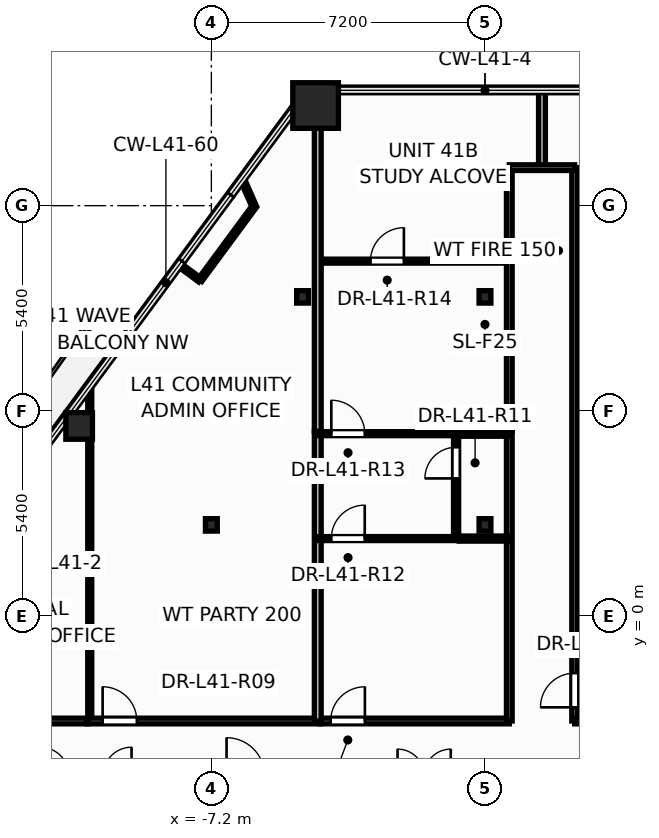
"""IFC4 building model, lengths in metres.
Left out: names, types, materials, properties, quantities, classifications, styles, units other than length and angle.
Written with IfcOpenShell. Run it as: python <this file> out.ifc"""

import sys

from ifc_helpers import new_model, si_unit, direction, frame, frame_2d, origin, origin_2d, place, context, subcontext, project, spatial, rectangle, hollow_rectangle, hollow_circle, i_section, extrude, element, fill, save


model = new_model("IFC4")
c1 = context("Model", 3, precision=1e-05, world=origin(), true_north=direction((0.0, 1.0)))
c2 = subcontext(c1, "Body", "Model", "MODEL_VIEW")
j1 = project(units=[si_unit("LENGTHUNIT", "METRE"), si_unit("PLANEANGLEUNIT", "RADIAN")], contexts=[c1])
p1 = place(None, origin())
s1 = spatial("IfcSite", under=j1, at=p1, CompositionType="ELEMENT")
p2 = place(p1, origin())
s2 = spatial("IfcBuilding", under=s1, at=p2, CompositionType="ELEMENT")
p3 = place(p2, frame((0.0, 0.0, 158.1)))
s3 = spatial("IfcBuildingStorey", under=s2, at=p3, CompositionType="ELEMENT", Elevation=158.1)
p4 = place(p3, frame((-4.457, 13.435, 0.0), z_axis=(0.0, 0.0, 1.0), x_axis=(1.0, 0.0, 0.0)))
e1 = element("IfcColumn", 1, at=p4, inside=s3, PredefinedType="COLUMN", context=c2, shape_type="SweptSolid", body=[
    extrude(hollow_rectangle(XDim=1.2, YDim=1.2, WallThickness=0.055, at=origin_2d()), origin(), (0.0, 0.0, 1.0), 3.6),
])
p5 = place(p3, frame((-10.679, 5.003, 0.0), z_axis=(0.0, 0.0, 1.0), x_axis=(1.0, 0.0, 0.0)))
e2 = element("IfcColumn", 2, at=p5, inside=s3, PredefinedType="COLUMN", context=c2, shape_type="SweptSolid", body=[
    extrude(hollow_circle(Radius=0.35, WallThickness=0.03, at=origin_2d()), origin(), (0.0, 0.0, 1.0), 3.6),
])
for number, where, z_axis, x_axis in (
    (3, (-7.2, 2.4, 0.0), (0.0, 0.0, 1.0), (1.0, 0.0, 0.0)),
    (4, (0.0, 2.4, 0.0), (0.0, 0.0, 1.0), (1.0, 0.0, 0.0)),
    (5, (-4.8, 8.4, 0.0), (0.0, 0.0, 1.0), (1.0, 0.0, 0.0)),
    (6, (0.0, 8.4, 0.0), (0.0, 0.0, 1.0), (1.0, 0.0, 0.0)),
):
    element("IfcColumn", number, at=place(p3, frame(where, z_axis=z_axis, x_axis=x_axis)), inside=s3, PredefinedType="COLUMN", context=c2, shape_type="SweptSolid", body=[
        extrude(i_section(OverallWidth=0.311, OverallDepth=0.327, WebThickness=0.016, FlangeThickness=0.025, at=origin_2d()), origin(), (0.0, 0.0, 1.0), 3.6),
    ])
p6 = place(p3, frame((2.36, -2.76, 0.0), z_axis=(0.0, 0.0, 1.0), x_axis=(0.0, 1.0, 0.0)))
e7 = element("IfcWall", 7, at=p6, inside=s3, PredefinedType="PARTITIONING", context=c2, shape_type="SweptSolid", body=[
    extrude(rectangle(XDim=14.56, YDim=0.15, at=frame_2d((7.28, 0.0))), origin(), (0.0, 0.0, 1.0), 2.325),
])
p7 = place(p6, frame((0.36, 0.0, 0.0)))
e8 = element("IfcOpeningElement", 8, at=p7, cuts=e7, PredefinedType="OPENING", context=c2, shape_type="SweptSolid", body=[
    extrude(rectangle(XDim=0.906, YDim=2.104, at=frame_2d((0.45, 1.052))), frame((0.0, 0.085, 0.0), z_axis=(0.0, -1.0, 0.0), x_axis=(1.0, 0.0, 0.0)), (0.0, 0.0, 1.0), 0.17),
])
p8 = place(p3, frame((-10.4, -2.76, 0.0), z_axis=(0.0, 0.0, 1.0), x_axis=(0.0, 1.0, 0.0)))
e9 = element("IfcWall", 9, at=p8, inside=s3, PredefinedType="PARTITIONING", context=c2, shape_type="SweptSolid", body=[
    extrude(rectangle(XDim=8.815, YDim=0.105, at=frame_2d((4.408, 0.0))), origin(), (0.0, 0.0, 1.0), 2.617),
])
p9 = place(p3, frame((-10.46, -2.76, 0.0), z_axis=(0.0, 0.0, 1.0), x_axis=(1.0, 0.0, 0.0)))
e10 = element("IfcWall", 10, at=p9, inside=s3, PredefinedType="PARTITIONING", context=c2, shape_type="SweptSolid", body=[
    extrude(rectangle(XDim=6.12, YDim=0.15, at=frame_2d((3.06, 0.0))), origin(), (0.0, 0.0, 1.0), 2.325),
])
p10 = place(p9, frame((0.399, 0.0, 0.0)))
e11 = element("IfcOpeningElement", 11, at=p10, cuts=e10, PredefinedType="OPENING", context=c2, shape_type="SweptSolid", body=[
    extrude(rectangle(XDim=0.906, YDim=2.104, at=frame_2d((0.45, 1.052))), frame((0.0, 0.085, 0.0), z_axis=(0.0, -1.0, 0.0), x_axis=(1.0, 0.0, 0.0)), (0.0, 0.0, 1.0), 0.17),
])
p11 = place(p3, frame((2.36, -2.76, 0.0), z_axis=(0.0, 0.0, 1.0), x_axis=(1.0, 0.0, 0.0)))
e12 = element("IfcWall", 12, at=p11, inside=s3, PredefinedType="PARTITIONING", context=c2, shape_type="SweptSolid", body=[
    extrude(rectangle(XDim=5.5, YDim=0.15, at=frame_2d((2.75, 0.0))), origin(), (0.0, 0.0, 1.0), 2.325),
])
p12 = place(p3, frame((-4.338, -2.76, 0.0), z_axis=(0.0, 0.0, 1.0), x_axis=(1.0, 0.0, 0.0)))
e13 = element("IfcWall", 13, at=p12, inside=s3, PredefinedType="PARTITIONING", context=c2, shape_type="SweptSolid", body=[
    extrude(rectangle(XDim=4.978, YDim=0.15, at=frame_2d((2.489, 0.0))), origin(), (0.0, 0.0, 1.0), 2.325),
])
p13 = place(p12, frame((0.278, 0.0, 0.0)))
e14 = element("IfcOpeningElement", 14, at=p13, cuts=e13, PredefinedType="OPENING", context=c2, shape_type="SweptSolid", body=[
    extrude(rectangle(XDim=0.906, YDim=2.104, at=frame_2d((0.45, 1.052))), frame((0.0, 0.085, 0.0), z_axis=(0.0, -1.0, 0.0), x_axis=(1.0, 0.0, 0.0)), (0.0, 0.0, 1.0), 0.17),
])
p14 = place(p3, frame((-4.4, 9.34, 0.0), z_axis=(0.0, 0.0, 1.0), x_axis=(1.0, 0.0, 0.0)))
e15 = element("IfcWall", 15, at=p14, inside=s3, PredefinedType="PARTITIONING", context=c2, shape_type="SweptSolid", body=[
    extrude(rectangle(XDim=5.04, YDim=0.105, at=frame_2d((2.52, 0.0))), origin(), (0.0, 0.0, 1.0), 3.35),
])
p15 = place(p14, frame((1.387, 0.0, 0.0)))
e16 = element("IfcOpeningElement", 16, at=p15, cuts=e15, PredefinedType="OPENING", context=c2, shape_type="SweptSolid", body=[
    extrude(rectangle(XDim=0.886, YDim=2.104, at=frame_2d((0.44, 1.052))), frame((0.0, 0.062, 0.0), z_axis=(0.0, -1.0, 0.0), x_axis=(1.0, 0.0, 0.0)), (0.0, 0.0, 1.0), 0.125),
])
p16 = place(p3, frame((0.64, -2.76, 0.0), z_axis=(0.0, 0.0, 1.0), x_axis=(0.0, 1.0, 0.0)))
e17 = element("IfcWall", 17, at=p16, inside=s3, PredefinedType="PARTITIONING", context=c2, shape_type="SweptSolid", body=[
    extrude(rectangle(XDim=7.62, YDim=0.15, at=frame_2d((3.81, 0.0))), origin(), (0.0, 0.0, 1.0), 2.325),
])
p17 = place(p3, frame((-4.4, -2.76, 0.0), z_axis=(0.0, 0.0, 1.0), x_axis=(0.0, 1.0, 0.0)))
e18 = element("IfcWall", 18, at=p17, inside=s3, PredefinedType="PARTITIONING", context=c2, shape_type="SweptSolid", body=[
    extrude(rectangle(XDim=7.62, YDim=0.18, at=frame_2d((3.81, 0.0))), origin(), (0.0, 0.0, 1.0), 2.325),
])
p18 = place(p3, frame((0.64, 4.862, 0.0), z_axis=(0.0, 0.0, 1.0), x_axis=(0.0, 1.0, 0.0)))
e19 = element("IfcWall", 19, at=p18, inside=s3, PredefinedType="PARTITIONING", context=c2, shape_type="SweptSolid", body=[
    extrude(rectangle(XDim=6.938, YDim=0.15, at=frame_2d((3.469, 0.0))), origin(), (0.0, 0.0, 1.0), 2.617),
])
p19 = place(p3, frame((-4.4, 4.862, 0.0), z_axis=(0.0, 0.0, 1.0), x_axis=(0.0, 1.0, 0.0)))
e20 = element("IfcWall", 20, at=p19, inside=s3, PredefinedType="PARTITIONING", context=c2, shape_type="SweptSolid", body=[
    extrude(rectangle(XDim=8.973, YDim=0.18, at=frame_2d((4.486, 0.0))), origin(), (0.0, 0.0, 1.0), 2.617),
])
p20 = place(p3, frame((-14.64, -2.76, 0.0), z_axis=(0.0, 0.0, 1.0), x_axis=(1.0, 0.0, 0.0)))
e21 = element("IfcWall", 21, at=p20, inside=s3, PredefinedType="PARTITIONING", context=c2, shape_type="SweptSolid", body=[
    extrude(rectangle(XDim=4.178, YDim=0.15, at=frame_2d((2.089, 0.0))), origin(), (0.0, 0.0, 1.0), 3.35),
])
p21 = place(p20, frame((0.357, 0.0, 0.0)))
e22 = element("IfcOpeningElement", 22, at=p21, cuts=e21, PredefinedType="OPENING", context=c2, shape_type="SweptSolid", body=[
    extrude(rectangle(XDim=0.906, YDim=2.104, at=frame_2d((0.45, 1.052))), frame((0.0, 0.085, 0.0), z_axis=(0.0, -1.0, 0.0), x_axis=(1.0, 0.0, 0.0)), (0.0, 0.0, 1.0), 0.17),
])
p22 = place(p3, frame((-4.4, 2.04, 0.0), z_axis=(0.0, 0.0, 1.0), x_axis=(1.0, 0.0, 0.0)))
e23 = element("IfcWall", 23, at=p22, inside=s3, PredefinedType="PARTITIONING", context=c2, shape_type="SweptSolid", body=[
    extrude(rectangle(XDim=3.72, YDim=0.105, at=frame_2d((1.86, 0.0))), origin(), (0.0, 0.0, 1.0), 2.918),
])
p23 = place(p22, frame((0.356, 0.0, 0.0)))
e24 = element("IfcOpeningElement", 24, at=p23, cuts=e23, PredefinedType="OPENING", context=c2, shape_type="SweptSolid", body=[
    extrude(rectangle(XDim=0.886, YDim=2.104, at=frame_2d((0.44, 1.052))), frame((0.0, 0.062, 0.0), z_axis=(0.0, -1.0, 0.0), x_axis=(1.0, 0.0, 0.0)), (0.0, 0.0, 1.0), 0.125),
])
p24 = place(p3, frame((-4.4, 4.8, 0.0), z_axis=(0.0, 0.0, 1.0), x_axis=(1.0, 0.0, 0.0)))
e25 = element("IfcWall", 25, at=p24, inside=s3, PredefinedType="PARTITIONING", context=c2, shape_type="SweptSolid", body=[
    extrude(rectangle(XDim=3.64, YDim=0.105, at=frame_2d((1.82, 0.0))), origin(), (0.0, 0.0, 1.0), 2.918),
])
p25 = place(p24, frame((0.356, 0.0, 0.0)))
e26 = element("IfcOpeningElement", 26, at=p25, cuts=e25, PredefinedType="OPENING", context=c2, shape_type="SweptSolid", body=[
    extrude(rectangle(XDim=0.886, YDim=2.104, at=frame_2d((0.44, 1.052))), frame((0.0, 0.062, 0.0), z_axis=(0.0, -1.0, 0.0), x_axis=(1.0, 0.0, 0.0)), (0.0, 0.0, 1.0), 0.125),
])
p26 = place(p3, frame((-0.76, 2.04, 0.0), z_axis=(0.0, 0.0, 1.0), x_axis=(0.0, 1.0, 0.0)))
e27 = element("IfcWall", 27, at=p26, inside=s3, PredefinedType="PARTITIONING", context=c2, shape_type="SweptSolid", body=[
    extrude(rectangle(XDim=2.76, YDim=0.135, at=frame_2d((1.38, 0.0))), origin(), (0.0, 0.0, 1.0), 2.325),
])
p27 = place(p26, frame((1.583, 0.0, 0.0)))
e28 = element("IfcOpeningElement", 28, at=p27, cuts=e27, PredefinedType="OPENING", context=c2, shape_type="SweptSolid", body=[
    extrude(rectangle(XDim=0.826, YDim=2.104, at=frame_2d((0.41, 1.052))), frame((0.0, 0.078, 0.0), z_axis=(0.0, -1.0, 0.0), x_axis=(1.0, 0.0, 0.0)), (0.0, 0.0, 1.0), 0.155),
])
p28 = place(p3, frame((-6.071, 10.776, 0.0), z_axis=(0.0, 0.0, 1.0), x_axis=(-0.593742732842, -0.804654936726, 0.0)))
e29 = element("IfcWall", 29, at=p28, inside=s3, PredefinedType="PARTITIONING", context=c2, shape_type="SweptSolid", body=[
    extrude(rectangle(XDim=2.404, YDim=0.12, at=frame_2d((1.202, 0.0))), origin(), (0.0, 0.0, 1.0), 3.35),
])
p29 = place(p3, frame((1.5, 11.8, 0.0), z_axis=(0.0, 0.0, 1.0), x_axis=(0.0, 1.0, 0.0)))
e30 = element("IfcWall", 30, at=p29, inside=s3, PredefinedType="PARTITIONING", context=c2, shape_type="SweptSolid", body=[
    extrude(rectangle(XDim=2.035, YDim=0.18, at=frame_2d((1.017, 0.0))), origin(), (0.0, 0.0, 1.0), 2.792),
])
p30 = place(p3, frame((-0.678, 2.04, 0.0), z_axis=(0.0, 0.0, 1.0), x_axis=(1.0, 0.0, 0.0)))
e31 = element("IfcWall", 31, at=p30, inside=s3, PredefinedType="PARTITIONING", context=c2, shape_type="SweptSolid", body=[
    extrude(rectangle(XDim=1.318, YDim=0.135, at=frame_2d((0.659, 0.0))), origin(), (0.0, 0.0, 1.0), 2.325),
])
p31 = place(p3, frame((-0.76, 4.8, 0.0), z_axis=(0.0, 0.0, 1.0), x_axis=(1.0, 0.0, 0.0)))
e32 = element("IfcWall", 32, at=p31, inside=s3, PredefinedType="PARTITIONING", context=c2, shape_type="SweptSolid", body=[
    extrude(rectangle(XDim=1.4, YDim=0.135, at=frame_2d((0.7, 0.0))), origin(), (0.0, 0.0, 1.0), 2.325),
])
p32 = place(p3, frame((0.64, 11.8, 0.0), z_axis=(0.0, 0.0, 1.0), x_axis=(1.0, 0.0, 0.0)))
e33 = element("IfcWall", 33, at=p32, inside=s3, PredefinedType="PARTITIONING", context=c2, shape_type="SweptSolid", body=[
    extrude(rectangle(XDim=1.72, YDim=0.15, at=frame_2d((0.86, 0.0))), origin(), (0.0, 0.0, 1.0), 3.35),
])
p33 = place(p3, frame((-6.383, 11.481, 0.0), z_axis=(0.0, 0.0, 1.0), x_axis=(0.404053030965, -0.91473556188, 0.0)))
e34 = element("IfcWall", 34, at=p33, inside=s3, PredefinedType="PARTITIONING", context=c2, shape_type="SweptSolid", body=[
    extrude(rectangle(XDim=0.771, YDim=0.12, at=frame_2d((0.386, 0.0))), origin(), (0.0, 0.0, 1.0), 2.792),
])
p34 = place(p3, frame((-7.499, 8.841, 0.0), z_axis=(0.0, 0.0, 1.0), x_axis=(-0.804652806385, 0.593745619922, 0.0)))
e35 = element("IfcWall", 35, at=p34, inside=s3, PredefinedType="PARTITIONING", context=c2, shape_type="SweptSolid", body=[
    extrude(rectangle(XDim=0.67, YDim=0.12, at=frame_2d((0.335, 0.0))), origin(), (0.0, 0.0, 1.0), 2.792),
])
p35 = place(p10, origin())
e36 = element("IfcDoor", 36, at=p35, inside=s3, OperationType="SINGLE_SWING_LEFT", PredefinedType="DOOR", context=c2, shape_type="SweptSolid", body=[
    extrude(rectangle(XDim=0.9, YDim=2.1, at=frame_2d((0.45, 1.05))), frame((0.0, 0.025, 0.0), z_axis=(0.0, -1.0, 0.0), x_axis=(1.0, 0.0, 0.0)), (0.0, 0.0, 1.0), 0.05),
])
fill(e11, e36)
p36 = place(p13, origin())
e37 = element("IfcDoor", 37, at=p36, inside=s3, OperationType="SINGLE_SWING_RIGHT", PredefinedType="DOOR", context=c2, shape_type="SweptSolid", body=[
    extrude(rectangle(XDim=0.9, YDim=2.1, at=frame_2d((0.45, 1.05))), frame((0.0, 0.025, 0.0), z_axis=(0.0, -1.0, 0.0), x_axis=(1.0, 0.0, 0.0)), (0.0, 0.0, 1.0), 0.05),
])
fill(e14, e37)
p37 = place(p27, origin())
e38 = element("IfcDoor", 38, at=p37, inside=s3, OperationType="SINGLE_SWING_LEFT", PredefinedType="DOOR", context=c2, shape_type="SweptSolid", body=[
    extrude(rectangle(XDim=0.82, YDim=2.1, at=frame_2d((0.41, 1.05))), frame((0.0, 0.025, 0.0), z_axis=(0.0, -1.0, 0.0), x_axis=(1.0, 0.0, 0.0)), (0.0, 0.0, 1.0), 0.05),
])
fill(e28, e38)
p38 = place(p23, origin())
e39 = element("IfcDoor", 39, at=p38, inside=s3, OperationType="SINGLE_SWING_RIGHT", PredefinedType="DOOR", context=c2, shape_type="SweptSolid", body=[
    extrude(rectangle(XDim=0.88, YDim=2.1, at=frame_2d((0.44, 1.05))), frame((0.0, 0.025, 0.0), z_axis=(0.0, -1.0, 0.0), x_axis=(1.0, 0.0, 0.0)), (0.0, 0.0, 1.0), 0.05),
])
fill(e24, e39)
p39 = place(p25, origin())
e40 = element("IfcDoor", 40, at=p39, inside=s3, OperationType="SINGLE_SWING_LEFT", PredefinedType="DOOR", context=c2, shape_type="SweptSolid", body=[
    extrude(rectangle(XDim=0.88, YDim=2.1, at=frame_2d((0.44, 1.05))), frame((0.0, 0.025, 0.0), z_axis=(0.0, -1.0, 0.0), x_axis=(1.0, 0.0, 0.0)), (0.0, 0.0, 1.0), 0.05),
])
fill(e26, e40)
p40 = place(p15, origin())
e41 = element("IfcDoor", 41, at=p40, inside=s3, OperationType="SINGLE_SWING_RIGHT", PredefinedType="DOOR", context=c2, shape_type="SweptSolid", body=[
    extrude(rectangle(XDim=0.88, YDim=2.1, at=frame_2d((0.44, 1.05))), frame((0.0, 0.025, 0.0), z_axis=(0.0, -1.0, 0.0), x_axis=(1.0, 0.0, 0.0)), (0.0, 0.0, 1.0), 0.05),
])
fill(e16, e41)
p41 = place(p7, origin())
e42 = element("IfcDoor", 42, at=p41, inside=s3, OperationType="SINGLE_SWING_LEFT", PredefinedType="DOOR", context=c2, shape_type="SweptSolid", body=[
    extrude(rectangle(XDim=0.9, YDim=2.1, at=frame_2d((0.45, 1.05))), frame((0.0, 0.025, 0.0), z_axis=(0.0, -1.0, 0.0), x_axis=(1.0, 0.0, 0.0)), (0.0, 0.0, 1.0), 0.05),
])
fill(e8, e42)
save(model, sys.argv[1])
